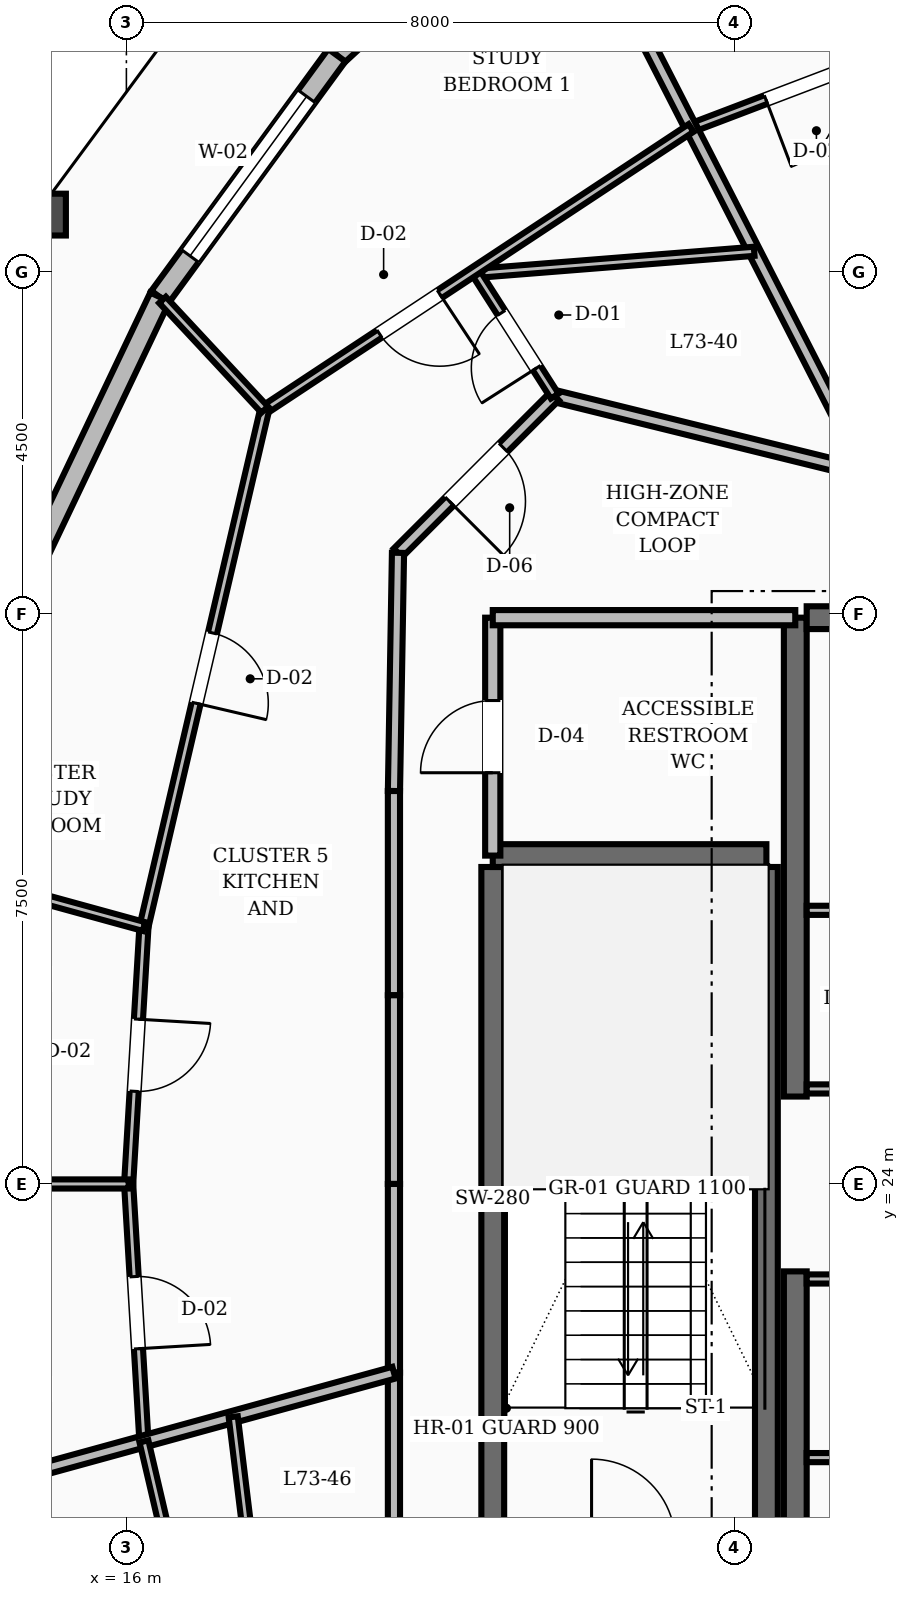
"""IFC4 building model, lengths in metres.
Left out: names, types, materials, properties, quantities, classifications, styles, units other than length and angle.
Written with IfcOpenShell. Run it as: python <this file> out.ifc"""

import sys

from ifc_helpers import new_model, si_unit, direction, frame, frame_2d, origin, place, context, subcontext, project, spatial, rectangle, extrude, element, fill, save


model = new_model("IFC4")
c1 = context("Model", 3, precision=1e-05, world=origin(), true_north=direction((0.0, 1.0)))
c2 = subcontext(c1, "Body", "Model", "MODEL_VIEW")
j1 = project(units=[si_unit("LENGTHUNIT", "METRE"), si_unit("PLANEANGLEUNIT", "RADIAN")], contexts=[c1])
p1 = place(None, origin())
s1 = spatial("IfcSite", under=j1, at=p1, CompositionType="ELEMENT")
p2 = place(p1, origin())
s2 = spatial("IfcBuilding", under=s1, at=p2, CompositionType="ELEMENT")
p3 = place(p2, frame((0.0, 0.0, 279.6)))
s3 = spatial("IfcBuildingStorey", under=s2, at=p3, CompositionType="ELEMENT", Elevation=279.6)
for number, where, z_axis, x_axis in (
    (1, (24.8, 16.55, 0.0), (0.0, 0.0, 1.0), (0.0, 1.0, 0.0)),
    (2, (24.8, 25.15, 0.0), (0.0, 0.0, 1.0), (0.0, 1.0, 0.0)),
):
    element("IfcWall", number, at=place(p3, frame(where, z_axis=z_axis, x_axis=x_axis)), inside=s3, PredefinedType="SHEAR", context=c2, shape_type="SweptSolid", body=[
        extrude(rectangle(XDim=6.3, YDim=0.3, at=frame_2d((3.15, 0.0))), origin(), (0.0, 0.0, 1.0), 3.6),
    ])
p4 = place(p3, frame((24.95, 31.45, 0.0), z_axis=(0.0, 0.0, 1.0), x_axis=(1.0, 0.0, 0.0)))
e3 = element("IfcWall", 3, at=p4, inside=s3, PredefinedType="SHEAR", context=c2, shape_type="SweptSolid", body=[
    extrude(rectangle(XDim=3.25, YDim=0.3, at=frame_2d((1.625, 0.0))), origin(), (0.0, 0.0, 1.0), 3.6),
])
for number, where, z_axis, x_axis in (
    (4, (20.82, 19.43, 0.0), (0.0, 0.0, 1.0), (0.0, 1.0, 0.0)),
    (5, (24.42, 19.43, 0.0), (0.0, 0.0, 1.0), (0.0, 1.0, 0.0)),
):
    element("IfcWall", number, at=place(p3, frame(where, z_axis=z_axis, x_axis=x_axis)), inside=s3, PredefinedType="SHEAR", context=c2, shape_type="SweptSolid", body=[
        extrude(rectangle(XDim=8.74, YDim=0.3, at=frame_2d((4.37, 0.0))), origin(), (0.0, 0.0, 1.0), 3.6),
    ])
p5 = place(p3, frame((20.82, 28.32, 0.0), z_axis=(0.0, 0.0, 1.0), x_axis=(1.0, 0.0, 0.0)))
e6 = element("IfcWall", 6, at=p5, inside=s3, PredefinedType="SHEAR", context=c2, shape_type="SweptSolid", body=[
    extrude(rectangle(XDim=3.6, YDim=0.3, at=frame_2d((1.8, 0.0))), origin(), (0.0, 0.0, 1.0), 3.6),
])
p6 = place(p3, frame((21.604, 41.461, 0.0), z_axis=(0.0, 0.0, 1.0), x_axis=(-0.735545935602, -0.677474853127, 0.0)))
e7 = element("IfcWall", 7, at=p6, inside=s3, PredefinedType="STANDARD", context=c2, shape_type="SweptSolid", body=[
    extrude(rectangle(XDim=3.855, YDim=0.28, at=frame_2d((1.928, 0.0))), origin(), (0.0, 0.0, 1.0), 2.88),
])
p7 = place(p3, frame((18.768, 38.85, 0.0), z_axis=(0.0, 0.0, 1.0), x_axis=(-0.590275846693, -0.807201601095, 0.0)))
e8 = element("IfcWall", 8, at=p7, inside=s3, PredefinedType="STANDARD", context=c2, shape_type="SweptSolid", body=[
    extrude(rectangle(XDim=3.942, YDim=0.28, at=frame_2d((1.971, 0.0))), origin(), (0.0, 0.0, 1.0), 2.88),
])
p8 = place(p7, frame((0.671, 0.0, 0.8)))
e9 = element("IfcOpeningElement", 9, at=p8, cuts=e8, PredefinedType="OPENING", context=c2, shape_type="SweptSolid", body=[
    extrude(rectangle(XDim=2.6, YDim=1.65, at=frame_2d((1.3, 0.825))), frame((0.0, 0.15, 0.0), z_axis=(0.0, -1.0, 0.0), x_axis=(1.0, 0.0, 0.0)), (0.0, 0.0, 1.0), 0.3),
])
p9 = place(p3, frame((16.441, 35.667, 0.0), z_axis=(0.0, 0.0, 1.0), x_axis=(-0.430011346388, -0.902823483289, 0.0)))
e10 = element("IfcWall", 10, at=p9, inside=s3, PredefinedType="STANDARD", context=c2, shape_type="SweptSolid", body=[
    extrude(rectangle(XDim=4.021, YDim=0.28, at=frame_2d((2.011, 0.0))), origin(), (0.0, 0.0, 1.0), 2.88),
])
p10 = place(p3, frame((20.82, 28.32, 0.0), z_axis=(0.0, 0.0, 1.0), x_axis=(0.0, 1.0, 0.0)))
e11 = element("IfcWall", 11, at=p10, inside=s3, PredefinedType="SOLIDWALL", context=c2, shape_type="SweptSolid", body=[
    extrude(rectangle(XDim=3.13, YDim=0.2, at=frame_2d((1.565, 0.0))), origin(), (0.0, 0.0, 1.0), 2.87),
])
p11 = place(p10, frame((1.09, 0.0, 0.0)))
e12 = element("IfcOpeningElement", 12, at=p11, cuts=e11, PredefinedType="OPENING", context=c2, shape_type="SweptSolid", body=[
    extrude(rectangle(XDim=0.95, YDim=2.1, at=frame_2d((0.475, 1.05))), frame((0.0, 0.11, 0.0), z_axis=(0.0, -1.0, 0.0), x_axis=(1.0, 0.0, 0.0)), (0.0, 0.0, 1.0), 0.22),
])
p12 = place(p3, frame((20.82, 31.45, 0.0), z_axis=(0.0, 0.0, 1.0), x_axis=(1.0, 0.0, 0.0)))
e13 = element("IfcWall", 13, at=p12, inside=s3, PredefinedType="SOLIDWALL", context=c2, shape_type="SweptSolid", body=[
    extrude(rectangle(XDim=3.98, YDim=0.2, at=frame_2d((1.99, 0.0))), origin(), (0.0, 0.0, 1.0), 2.87),
])
p13 = place(p3, frame((24.95, 25.25, 0.0), z_axis=(0.0, 0.0, 1.0), x_axis=(1.0, 0.0, 0.0)))
e14 = element("IfcWall", 14, at=p13, inside=s3, PredefinedType="PARTITIONING", context=c2, shape_type="SweptSolid", body=[
    extrude(rectangle(XDim=3.2, YDim=0.12, at=frame_2d((1.6, 0.0))), origin(), (0.0, 0.0, 1.0), 2.87),
])
p14 = place(p13, frame((1.125, 0.0, 0.0)))
e15 = element("IfcOpeningElement", 15, at=p14, cuts=e14, PredefinedType="OPENING", context=c2, shape_type="SweptSolid", body=[
    extrude(rectangle(XDim=0.95, YDim=2.1, at=frame_2d((0.475, 1.05))), frame((0.0, 0.07, 0.0), z_axis=(0.0, -1.0, 0.0), x_axis=(1.0, 0.0, 0.0)), (0.0, 0.0, 1.0), 0.14),
])
p15 = place(p3, frame((24.95, 22.75, 0.0), z_axis=(0.0, 0.0, 1.0), x_axis=(1.0, 0.0, 0.0)))
e16 = element("IfcWall", 16, at=p15, inside=s3, PredefinedType="PARTITIONING", context=c2, shape_type="SweptSolid", body=[
    extrude(rectangle(XDim=3.2, YDim=0.12, at=frame_2d((1.6, 0.0))), origin(), (0.0, 0.0, 1.0), 2.87),
])
p16 = place(p15, frame((1.125, 0.0, 0.0)))
e17 = element("IfcOpeningElement", 17, at=p16, cuts=e16, PredefinedType="OPENING", context=c2, shape_type="SweptSolid", body=[
    extrude(rectangle(XDim=0.95, YDim=2.1, at=frame_2d((0.475, 1.05))), frame((0.0, 0.07, 0.0), z_axis=(0.0, -1.0, 0.0), x_axis=(1.0, 0.0, 0.0)), (0.0, 0.0, 1.0), 0.14),
])
p17 = place(p3, frame((24.95, 27.6, 0.0), z_axis=(0.0, 0.0, 1.0), x_axis=(1.0, 0.0, 0.0)))
e18 = element("IfcWall", 18, at=p17, inside=s3, PredefinedType="PARTITIONING", context=c2, shape_type="SweptSolid", body=[
    extrude(rectangle(XDim=3.2, YDim=0.12, at=frame_2d((1.6, 0.0))), origin(), (0.0, 0.0, 1.0), 2.87),
])
p18 = place(p17, frame((0.44, 0.0, 0.0)))
e19 = element("IfcOpeningElement", 19, at=p18, cuts=e18, PredefinedType="OPENING", context=c2, shape_type="SweptSolid", body=[
    extrude(rectangle(XDim=0.86, YDim=2.1, at=frame_2d((0.43, 1.05))), frame((0.0, 0.07, 0.0), z_axis=(0.0, -1.0, 0.0), x_axis=(1.0, 0.0, 0.0)), (0.0, 0.0, 1.0), 0.14),
])
p19 = place(p17, frame((1.9, 0.0, 0.0)))
e20 = element("IfcOpeningElement", 20, at=p19, cuts=e18, PredefinedType="OPENING", context=c2, shape_type="SweptSolid", body=[
    extrude(rectangle(XDim=0.86, YDim=2.1, at=frame_2d((0.43, 1.05))), frame((0.0, 0.07, 0.0), z_axis=(0.0, -1.0, 0.0), x_axis=(1.0, 0.0, 0.0)), (0.0, 0.0, 1.0), 0.14),
])
p20 = place(p3, frame((24.95, 20.4, 0.0), z_axis=(0.0, 0.0, 1.0), x_axis=(1.0, 0.0, 0.0)))
e21 = element("IfcWall", 21, at=p20, inside=s3, PredefinedType="PARTITIONING", context=c2, shape_type="SweptSolid", body=[
    extrude(rectangle(XDim=3.2, YDim=0.12, at=frame_2d((1.6, 0.0))), origin(), (0.0, 0.0, 1.0), 2.87),
])
p21 = place(p20, frame((1.125, 0.0, 0.0)))
e22 = element("IfcOpeningElement", 22, at=p21, cuts=e21, PredefinedType="OPENING", context=c2, shape_type="SweptSolid", body=[
    extrude(rectangle(XDim=0.95, YDim=2.1, at=frame_2d((0.475, 1.05))), frame((0.0, 0.07, 0.0), z_axis=(0.0, -1.0, 0.0), x_axis=(1.0, 0.0, 0.0)), (0.0, 0.0, 1.0), 0.14),
])
p22 = place(p3, frame((25.752, 33.35, 0.0), z_axis=(0.0, 0.0, 1.0), x_axis=(-0.970939799552, 0.239323850978, 0.0)))
e23 = element("IfcWall", 23, at=p22, inside=s3, PredefinedType="SOLIDWALL", context=c2, shape_type="SweptSolid", body=[
    extrude(rectangle(XDim=4.241, YDim=0.16, at=frame_2d((2.12, 0.0))), origin(), (0.0, 0.0, 1.0), 2.87),
])
p23 = place(p3, frame((21.635, 34.365, 0.0), z_axis=(0.0, 0.0, 1.0), x_axis=(-0.707106781187, -0.707106781187, 0.0)))
e24 = element("IfcWall", 24, at=p23, inside=s3, PredefinedType="SOLIDWALL", context=c2, shape_type="SweptSolid", body=[
    extrude(rectangle(XDim=2.916, YDim=0.16, at=frame_2d((1.458, 0.0))), origin(), (0.0, 0.0, 1.0), 2.87),
])
p24 = place(p23, frame((0.958, 0.0, 0.0)))
e25 = element("IfcOpeningElement", 25, at=p24, cuts=e24, PredefinedType="OPENING", context=c2, shape_type="SweptSolid", body=[
    extrude(rectangle(XDim=1.0, YDim=2.1, at=frame_2d((0.5, 1.05))), frame((0.0, 0.09, 0.0), z_axis=(0.0, -1.0, 0.0), x_axis=(1.0, 0.0, 0.0)), (0.0, 0.0, 1.0), 0.18),
])
p25 = place(p3, frame((19.573, 32.303, 0.0), z_axis=(0.0, 0.0, 1.0), x_axis=(-0.016981035134, -0.999855811828, 0.0)))
e26 = element("IfcWall", 26, at=p25, inside=s3, PredefinedType="SOLIDWALL", context=c2, shape_type="SweptSolid", body=[
    extrude(rectangle(XDim=3.134, YDim=0.16, at=frame_2d((1.567, 0.0))), origin(), (0.0, 0.0, 1.0), 2.87),
])
p26 = place(p3, frame((19.52, 29.169, 0.0), z_axis=(0.0, 0.0, 1.0), x_axis=(0.0, -1.0, 0.0)))
e27 = element("IfcWall", 27, at=p26, inside=s3, PredefinedType="SOLIDWALL", context=c2, shape_type="SweptSolid", body=[
    extrude(rectangle(XDim=2.687, YDim=0.16, at=frame_2d((1.344, 0.0))), origin(), (0.0, 0.0, 1.0), 2.87),
])
for number, where, z_axis, x_axis in (
    (28, (19.52, 26.482, 0.0), (0.0, 0.0, 1.0), (0.0, -1.0, 0.0)),
    (29, (19.52, 24.0, 0.0), (0.0, 0.0, 1.0), (0.0, -1.0, 0.0)),
):
    element("IfcWall", number, at=place(p3, frame(where, z_axis=z_axis, x_axis=x_axis)), inside=s3, PredefinedType="SOLIDWALL", context=c2, shape_type="SweptSolid", body=[
        extrude(rectangle(XDim=2.482, YDim=0.16, at=frame_2d((1.241, 0.0))), origin(), (0.0, 0.0, 1.0), 2.87),
    ])
p27 = place(p3, frame((19.52, 21.518, 0.0), z_axis=(0.0, 0.0, 1.0), x_axis=(0.0, -1.0, 0.0)))
e30 = element("IfcWall", 30, at=p27, inside=s3, PredefinedType="SOLIDWALL", context=c2, shape_type="SweptSolid", body=[
    extrude(rectangle(XDim=2.687, YDim=0.16, at=frame_2d((1.344, 0.0))), origin(), (0.0, 0.0, 1.0), 2.87),
])
p28 = place(p3, frame((26.286, 38.979, 0.0), z_axis=(0.0, 0.0, 1.0), x_axis=(-0.934660984689, -0.355540213901, 0.0)))
e31 = element("IfcWall", 31, at=p28, inside=s3, PredefinedType="PARTITIONING", context=c2, shape_type="SweptSolid", body=[
    extrude(rectangle(XDim=3.056, YDim=0.12, at=frame_2d((1.528, 0.0))), origin(), (0.0, 0.0, 1.0), 2.87),
])
p29 = place(p28, frame((1.053, 0.0, 0.0)))
e32 = element("IfcOpeningElement", 32, at=p29, cuts=e31, PredefinedType="OPENING", context=c2, shape_type="SweptSolid", body=[
    extrude(rectangle(XDim=0.95, YDim=2.1, at=frame_2d((0.475, 1.05))), frame((0.0, 0.07, 0.0), z_axis=(0.0, -1.0, 0.0), x_axis=(1.0, 0.0, 0.0)), (0.0, 0.0, 1.0), 0.14),
])
p30 = place(p3, frame((25.752, 33.35, 0.0), z_axis=(0.0, 0.0, 1.0), x_axis=(-0.455343199474, 0.890315994854, 0.0)))
e33 = element("IfcWall", 33, at=p30, inside=s3, PredefinedType="SOLIDWALL", context=c2, shape_type="SweptSolid", body=[
    extrude(rectangle(XDim=9.061, YDim=0.16, at=frame_2d((4.53, 0.0))), origin(), (0.0, 0.0, 1.0), 2.87),
])
p31 = place(p3, frame((24.259, 36.27, 0.0), z_axis=(0.0, 0.0, 1.0), x_axis=(-0.996857888432, -0.079210796423, 0.0)))
e34 = element("IfcWall", 34, at=p31, inside=s3, PredefinedType="PARTITIONING", context=c2, shape_type="SweptSolid", body=[
    extrude(rectangle(XDim=3.668, YDim=0.12, at=frame_2d((1.834, 0.0))), origin(), (0.0, 0.0, 1.0), 2.87),
])
p32 = place(p3, frame((21.635, 34.365, 0.0), z_axis=(0.0, 0.0, 1.0), x_axis=(-0.538663184237, 0.842521200889, 0.0)))
e35 = element("IfcWall", 35, at=p32, inside=s3, PredefinedType="PARTITIONING", context=c2, shape_type="SweptSolid", body=[
    extrude(rectangle(XDim=1.916, YDim=0.12, at=frame_2d((0.958, 0.0))), origin(), (0.0, 0.0, 1.0), 2.87),
])
p33 = place(p32, frame((0.44, 0.0, 0.0)))
e36 = element("IfcOpeningElement", 36, at=p33, cuts=e35, PredefinedType="OPENING", context=c2, shape_type="SweptSolid", body=[
    extrude(rectangle(XDim=0.86, YDim=2.1, at=frame_2d((0.43, 1.05))), frame((0.0, 0.07, 0.0), z_axis=(0.0, -1.0, 0.0), x_axis=(1.0, 0.0, 0.0)), (0.0, 0.0, 1.0), 0.14),
])
p34 = place(p3, frame((23.429, 37.892, 0.0), z_axis=(0.0, 0.0, 1.0), x_axis=(-0.834428061238, -0.551116875643, 0.0)))
e37 = element("IfcWall", 37, at=p34, inside=s3, PredefinedType="PARTITIONING", context=c2, shape_type="SweptSolid", body=[
    extrude(rectangle(XDim=6.723, YDim=0.12, at=frame_2d((3.362, 0.0))), origin(), (0.0, 0.0, 1.0), 2.87),
])
p35 = place(p34, frame((3.963, 0.0, 0.0)))
e38 = element("IfcOpeningElement", 38, at=p35, cuts=e37, PredefinedType="OPENING", context=c2, shape_type="SweptSolid", body=[
    extrude(rectangle(XDim=0.95, YDim=2.1, at=frame_2d((0.475, 1.05))), frame((0.0, 0.07, 0.0), z_axis=(0.0, -1.0, 0.0), x_axis=(1.0, 0.0, 0.0)), (0.0, 0.0, 1.0), 0.14),
])
p36 = place(p3, frame((17.819, 34.187, 0.0), z_axis=(0.0, 0.0, 1.0), x_axis=(-0.22738655048, -0.973804578271, 0.0)))
e39 = element("IfcWall", 39, at=p36, inside=s3, PredefinedType="PARTITIONING", context=c2, shape_type="SweptSolid", body=[
    extrude(rectangle(XDim=6.983, YDim=0.12, at=frame_2d((3.492, 0.0))), origin(), (0.0, 0.0, 1.0), 2.87),
])
p37 = place(p36, frame((3.017, 0.0, 0.0)))
e40 = element("IfcOpeningElement", 40, at=p37, cuts=e39, PredefinedType="OPENING", context=c2, shape_type="SweptSolid", body=[
    extrude(rectangle(XDim=0.95, YDim=2.1, at=frame_2d((0.475, 1.05))), frame((0.0, 0.07, 0.0), z_axis=(0.0, -1.0, 0.0), x_axis=(1.0, 0.0, 0.0)), (0.0, 0.0, 1.0), 0.14),
])
p38 = place(p3, frame((17.819, 34.187, 0.0), z_axis=(0.0, 0.0, 1.0), x_axis=(-0.681404809589, 0.73190674643, 0.0)))
e41 = element("IfcWall", 41, at=p38, inside=s3, PredefinedType="PARTITIONING", context=c2, shape_type="SweptSolid", body=[
    extrude(rectangle(XDim=1.972, YDim=0.12, at=frame_2d((0.986, 0.0))), origin(), (0.0, 0.0, 1.0), 2.87),
])
p39 = place(p3, frame((16.231, 27.387, 0.0), z_axis=(0.0, 0.0, 1.0), x_axis=(-0.059367421014, -0.998236199164, 0.0)))
e42 = element("IfcWall", 42, at=p39, inside=s3, PredefinedType="PARTITIONING", context=c2, shape_type="SweptSolid", body=[
    extrude(rectangle(XDim=3.393, YDim=0.12, at=frame_2d((1.696, 0.0))), origin(), (0.0, 0.0, 1.0), 2.87),
])
p40 = place(p39, frame((1.221, 0.0, 0.0)))
e43 = element("IfcOpeningElement", 43, at=p40, cuts=e42, PredefinedType="OPENING", context=c2, shape_type="SweptSolid", body=[
    extrude(rectangle(XDim=0.95, YDim=2.1, at=frame_2d((0.475, 1.05))), frame((0.0, 0.07, 0.0), z_axis=(0.0, -1.0, 0.0), x_axis=(1.0, 0.0, 0.0)), (0.0, 0.0, 1.0), 0.14),
])
p41 = place(p3, frame((16.231, 27.387, 0.0), z_axis=(0.0, 0.0, 1.0), x_axis=(-0.964245725416, 0.265009775324, 0.0)))
e44 = element("IfcWall", 44, at=p41, inside=s3, PredefinedType="PARTITIONING", context=c2, shape_type="SweptSolid", body=[
    extrude(rectangle(XDim=2.63, YDim=0.12, at=frame_2d((1.315, 0.0))), origin(), (0.0, 0.0, 1.0), 2.87),
])
p42 = place(p3, frame((16.03, 24.0, 0.0), z_axis=(0.0, 0.0, 1.0), x_axis=(0.059367421014, -0.998236199164, 0.0)))
e45 = element("IfcWall", 45, at=p42, inside=s3, PredefinedType="PARTITIONING", context=c2, shape_type="SweptSolid", body=[
    extrude(rectangle(XDim=3.393, YDim=0.12, at=frame_2d((1.696, 0.0))), origin(), (0.0, 0.0, 1.0), 2.87),
])
p43 = place(p42, frame((1.221, 0.0, 0.0)))
e46 = element("IfcOpeningElement", 46, at=p43, cuts=e45, PredefinedType="OPENING", context=c2, shape_type="SweptSolid", body=[
    extrude(rectangle(XDim=0.95, YDim=2.1, at=frame_2d((0.475, 1.05))), frame((0.0, 0.07, 0.0), z_axis=(0.0, -1.0, 0.0), x_axis=(1.0, 0.0, 0.0)), (0.0, 0.0, 1.0), 0.14),
])
p44 = place(p3, frame((16.03, 24.0, 0.0), z_axis=(0.0, 0.0, 1.0), x_axis=(-1.0, 0.0, 0.0)))
e47 = element("IfcWall", 47, at=p44, inside=s3, PredefinedType="PARTITIONING", context=c2, shape_type="SweptSolid", body=[
    extrude(rectangle(XDim=2.692, YDim=0.12, at=frame_2d((1.346, 0.0))), origin(), (0.0, 0.0, 1.0), 2.87),
])
p45 = place(p3, frame((19.52, 21.518, 0.0), z_axis=(0.0, 0.0, 1.0), x_axis=(-0.964228378678, -0.265072883849, 0.0)))
e48 = element("IfcWall", 48, at=p45, inside=s3, PredefinedType="SOLIDWALL", context=c2, shape_type="SweptSolid", body=[
    extrude(rectangle(XDim=6.041, YDim=0.16, at=frame_2d((3.021, 0.0))), origin(), (0.0, 0.0, 1.0), 2.87),
])
p46 = place(p3, frame((17.406, 20.936, 0.0), z_axis=(0.0, 0.0, 1.0), x_axis=(0.121249255799, -0.992622092222, 0.0)))
e49 = element("IfcWall", 49, at=p46, inside=s3, PredefinedType="PARTITIONING", context=c2, shape_type="SweptSolid", body=[
    extrude(rectangle(XDim=3.161, YDim=0.12, at=frame_2d((1.581, 0.0))), origin(), (0.0, 0.0, 1.0), 2.87),
])
p47 = place(p3, frame((16.231, 20.613, 0.0), z_axis=(0.0, 0.0, 1.0), x_axis=(0.22738655048, -0.973804578271, 0.0)))
e50 = element("IfcWall", 50, at=p47, inside=s3, PredefinedType="PARTITIONING", context=c2, shape_type="SweptSolid", body=[
    extrude(rectangle(XDim=6.983, YDim=0.12, at=frame_2d((3.492, 0.0))), origin(), (0.0, 0.0, 1.0), 2.87),
])
p48 = place(p47, frame((4.15, 0.0, 0.0)))
e51 = element("IfcOpeningElement", 51, at=p48, cuts=e50, PredefinedType="OPENING", context=c2, shape_type="SweptSolid", body=[
    extrude(rectangle(XDim=0.95, YDim=2.1, at=frame_2d((0.475, 1.05))), frame((0.0, 0.07, 0.0), z_axis=(0.0, -1.0, 0.0), x_axis=(1.0, 0.0, 0.0)), (0.0, 0.0, 1.0), 0.14),
])
p49 = place(p8, origin())
e52 = element("IfcWindow", 52, at=p49, inside=s3, PartitioningType="SINGLE_PANEL", PredefinedType="WINDOW", context=c2, shape_type="SweptSolid", body=[
    extrude(rectangle(XDim=2.6, YDim=1.65, at=frame_2d((1.3, 0.825))), frame((0.0, 0.03, 0.0), z_axis=(0.0, -1.0, 0.0), x_axis=(1.0, 0.0, 0.0)), (0.0, 0.0, 1.0), 0.06),
])
fill(e9, e52)
p50 = place(p11, origin())
e53 = element("IfcDoor", 53, at=p50, inside=s3, OperationType="SINGLE_SWING_LEFT", PredefinedType="DOOR", context=c2, shape_type="SweptSolid", body=[
    extrude(rectangle(XDim=0.95, YDim=2.1, at=frame_2d((0.475, 1.05))), frame((0.0, 0.025, 0.0), z_axis=(0.0, -1.0, 0.0), x_axis=(1.0, 0.0, 0.0)), (0.0, 0.0, 1.0), 0.05),
])
fill(e12, e53)
p51 = place(p29, origin())
e54 = element("IfcDoor", 54, at=p51, inside=s3, OperationType="SINGLE_SWING_RIGHT", PredefinedType="DOOR", context=c2, shape_type="SweptSolid", body=[
    extrude(rectangle(XDim=0.95, YDim=2.1, at=frame_2d((0.475, 1.05))), frame((0.0, 0.025, 0.0), z_axis=(0.0, -1.0, 0.0), x_axis=(1.0, 0.0, 0.0)), (0.0, 0.0, 1.0), 0.05),
])
fill(e32, e54)
p52 = place(p33, origin())
e55 = element("IfcDoor", 55, at=p52, inside=s3, OperationType="SINGLE_SWING_LEFT", PredefinedType="DOOR", context=c2, shape_type="SweptSolid", body=[
    extrude(rectangle(XDim=0.86, YDim=2.1, at=frame_2d((0.43, 1.05))), frame((0.0, 0.025, 0.0), z_axis=(0.0, -1.0, 0.0), x_axis=(1.0, 0.0, 0.0)), (0.0, 0.0, 1.0), 0.05),
])
fill(e36, e55)
p53 = place(p24, origin())
e56 = element("IfcDoor", 56, at=p53, inside=s3, OperationType="SINGLE_SWING_RIGHT", PredefinedType="DOOR", context=c2, shape_type="SweptSolid", body=[
    extrude(rectangle(XDim=1.0, YDim=2.1, at=frame_2d((0.5, 1.05))), frame((0.0, 0.025, 0.0), z_axis=(0.0, -1.0, 0.0), x_axis=(1.0, 0.0, 0.0)), (0.0, 0.0, 1.0), 0.05),
])
fill(e25, e56)
p54 = place(p35, origin())
e57 = element("IfcDoor", 57, at=p54, inside=s3, OperationType="SINGLE_SWING_LEFT", PredefinedType="DOOR", context=c2, shape_type="SweptSolid", body=[
    extrude(rectangle(XDim=0.95, YDim=2.1, at=frame_2d((0.475, 1.05))), frame((0.0, 0.025, 0.0), z_axis=(0.0, -1.0, 0.0), x_axis=(1.0, 0.0, 0.0)), (0.0, 0.0, 1.0), 0.05),
])
fill(e38, e57)
p55 = place(p37, origin())
e58 = element("IfcDoor", 58, at=p55, inside=s3, OperationType="SINGLE_SWING_RIGHT", PredefinedType="DOOR", context=c2, shape_type="SweptSolid", body=[
    extrude(rectangle(XDim=0.95, YDim=2.1, at=frame_2d((0.475, 1.05))), frame((0.0, 0.025, 0.0), z_axis=(0.0, -1.0, 0.0), x_axis=(1.0, 0.0, 0.0)), (0.0, 0.0, 1.0), 0.05),
])
fill(e40, e58)
p56 = place(p40, origin())
e59 = element("IfcDoor", 59, at=p56, inside=s3, OperationType="SINGLE_SWING_LEFT", PredefinedType="DOOR", context=c2, shape_type="SweptSolid", body=[
    extrude(rectangle(XDim=0.95, YDim=2.1, at=frame_2d((0.475, 1.05))), frame((0.0, 0.025, 0.0), z_axis=(0.0, -1.0, 0.0), x_axis=(1.0, 0.0, 0.0)), (0.0, 0.0, 1.0), 0.05),
])
fill(e43, e59)
p57 = place(p43, origin())
e60 = element("IfcDoor", 60, at=p57, inside=s3, OperationType="SINGLE_SWING_RIGHT", PredefinedType="DOOR", context=c2, shape_type="SweptSolid", body=[
    extrude(rectangle(XDim=0.95, YDim=2.1, at=frame_2d((0.475, 1.05))), frame((0.0, 0.025, 0.0), z_axis=(0.0, -1.0, 0.0), x_axis=(1.0, 0.0, 0.0)), (0.0, 0.0, 1.0), 0.05),
])
fill(e46, e60)
save(model, sys.argv[1])
